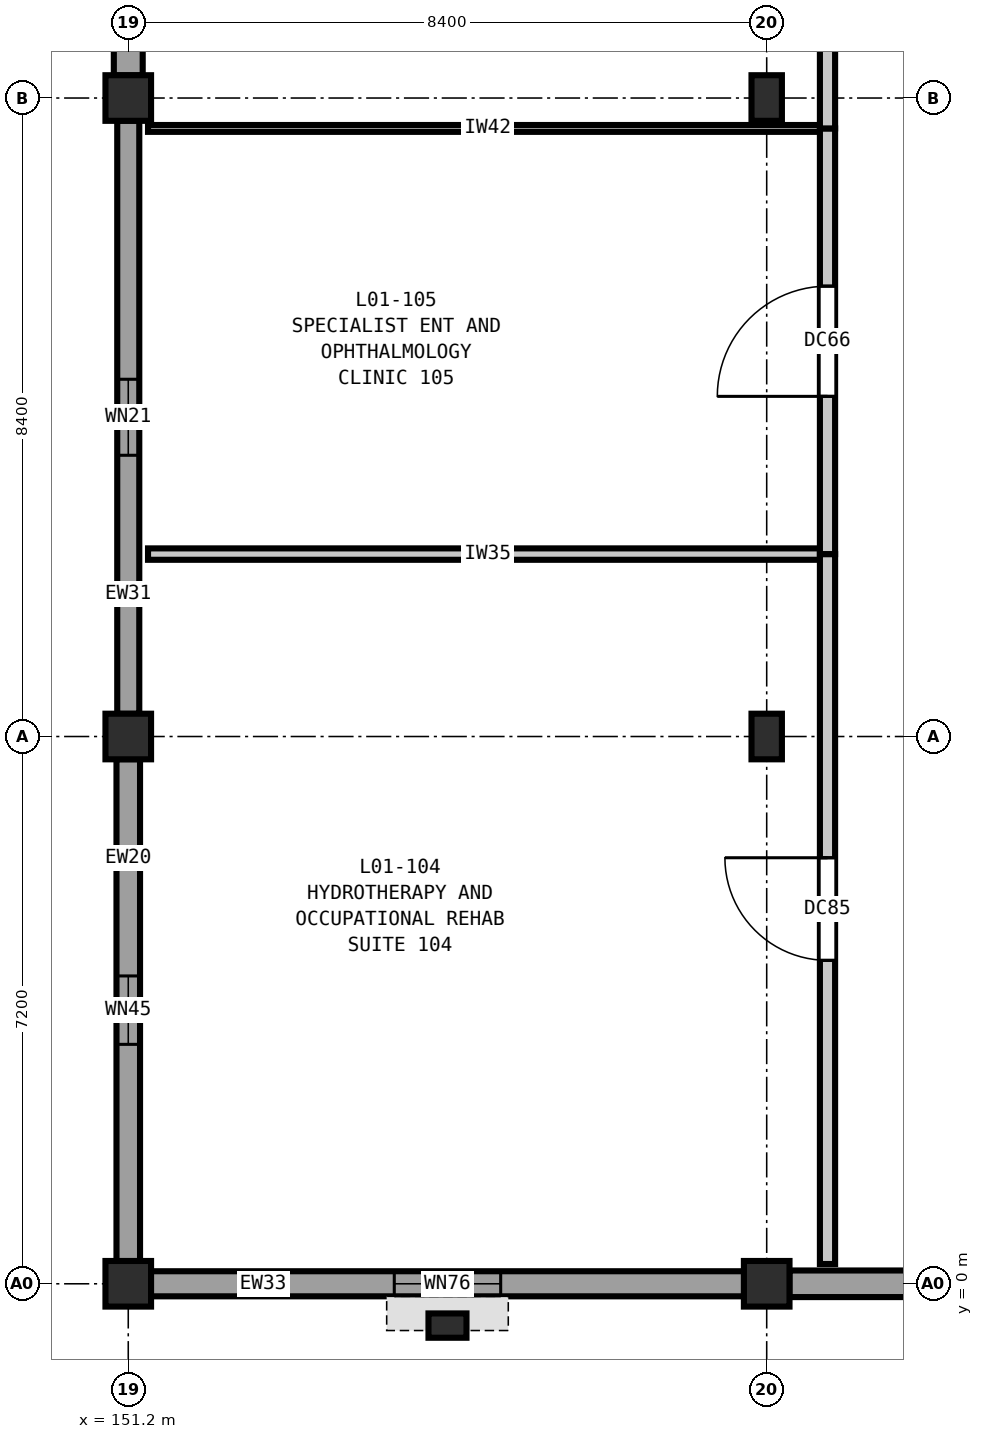
"""IFC4 building model, lengths in metres.
Left out: names, types, materials, properties, quantities, classifications, styles, units other than length and angle.
Written with IfcOpenShell. Run it as: python <this file> out.ifc"""

import sys

from ifc_helpers import new_model, si_unit, direction, frame, frame_2d, origin, origin_2d, place, context, subcontext, project, spatial, rectangle, extrude, element, fill, save


model = new_model("IFC4")
c1 = context("Model", 3, precision=1e-05, world=origin(), true_north=direction((0.0, 1.0)))
c2 = subcontext(c1, "Body", "Model", "MODEL_VIEW")
j1 = project(units=[si_unit("LENGTHUNIT", "METRE"), si_unit("PLANEANGLEUNIT", "RADIAN")], contexts=[c1])
p1 = place(None, origin())
s1 = spatial("IfcSite", under=j1, at=p1, CompositionType="ELEMENT")
p2 = place(p1, origin())
s2 = spatial("IfcBuilding", under=s1, at=p2, CompositionType="ELEMENT")
p3 = place(p2, frame((0.0, 0.0, 5.4)))
s3 = spatial("IfcBuildingStorey", under=s2, at=p3, CompositionType="ELEMENT", Elevation=5.4)
for number, where, z_axis, x_axis in (
    (1, (151.2, 0.0, 0.0), (0.0, 0.0, 1.0), (1.0, 0.0, 0.0)),
    (2, (151.2, 7.2, 0.0), (0.0, 0.0, 1.0), (1.0, 0.0, 0.0)),
    (3, (151.2, 15.6, 0.0), (0.0, 0.0, 1.0), (1.0, 0.0, 0.0)),
    (4, (159.6, 0.0, 0.0), (0.0, 0.0, 1.0), (1.0, 0.0, 0.0)),
):
    element("IfcColumn", number, at=place(p3, frame(where, z_axis=z_axis, x_axis=x_axis)), inside=s3, PredefinedType="COLUMN", context=c2, shape_type="SweptSolid", body=[
        extrude(rectangle(XDim=0.6, YDim=0.6, at=origin_2d()), origin(), (0.0, 0.0, 1.0), 5.4),
    ])
for number, where, z_axis, x_axis in (
    (5, (159.6, 7.2, 0.0), (0.0, 0.0, 1.0), (1.0, 0.0, 0.0)),
    (6, (159.6, 15.6, 0.0), (0.0, 0.0, 1.0), (1.0, 0.0, 0.0)),
):
    element("IfcColumn", number, at=place(p3, frame(where, z_axis=z_axis, x_axis=x_axis)), inside=s3, PredefinedType="COLUMN", context=c2, shape_type="SweptSolid", body=[
        extrude(rectangle(XDim=0.4, YDim=0.6, at=origin_2d()), origin(), (0.0, 0.0, 1.0), 5.4),
    ])
p4 = place(p3, frame((155.4, -0.55, 0.0), z_axis=(0.0, 0.0, 1.0), x_axis=(1.0, 0.0, 0.0)))
e7 = element("IfcColumn", 7, at=p4, inside=s3, PredefinedType="PILASTER", context=c2, shape_type="SweptSolid", body=[
    extrude(rectangle(XDim=0.5, YDim=0.32, at=origin_2d()), origin(), (0.0, 0.0, 1.0), 5.4),
])
p5 = place(p3, frame((167.702, 0.0, 0.0), z_axis=(0.0, 0.0, 1.0), x_axis=(-1.0, 0.0, 0.0)))
e8 = element("IfcWall", 8, at=p5, inside=s3, PredefinedType="SOLIDWALL", context=c2, shape_type="SweptSolid", body=[
    extrude(rectangle(XDim=7.804, YDim=0.35, at=frame_2d((3.902, 0.0))), origin(), (0.0, 0.0, 1.0), 4.68),
])
p6 = place(p5, frame((2.033, 0.0, 0.9)))
e9 = element("IfcOpeningElement", 9, at=p6, cuts=e8, PredefinedType="OPENING", context=c2, shape_type="SweptSolid", body=[
    extrude(rectangle(XDim=1.25, YDim=1.4, at=frame_2d((0.625, 0.7))), frame((0.0, 0.185, 0.0), z_axis=(0.0, -1.0, 0.0), x_axis=(1.0, 0.0, 0.0)), (0.0, 0.0, 1.0), 0.37),
])
p7 = place(p3, frame((159.302, 0.0, 0.0), z_axis=(0.0, 0.0, 1.0), x_axis=(-1.0, 0.0, 0.0)))
e10 = element("IfcWall", 10, at=p7, inside=s3, PredefinedType="SOLIDWALL", context=c2, shape_type="SweptSolid", body=[
    extrude(rectangle(XDim=7.804, YDim=0.33, at=frame_2d((3.902, 0.0))), origin(), (0.0, 0.0, 1.0), 4.68),
])
p8 = place(p7, frame((3.202, 0.0, 0.9)))
e11 = element("IfcOpeningElement", 11, at=p8, cuts=e10, PredefinedType="OPENING", context=c2, shape_type="SweptSolid", body=[
    extrude(rectangle(XDim=1.4, YDim=1.4, at=frame_2d((0.7, 0.7))), frame((0.0, 0.175, 0.0), z_axis=(0.0, -1.0, 0.0), x_axis=(1.0, 0.0, 0.0)), (0.0, 0.0, 1.0), 0.35),
])
p9 = place(p3, frame((151.2, 0.298, 0.0), z_axis=(0.0, 0.0, 1.0), x_axis=(0.0, 1.0, 0.0)))
e12 = element("IfcWall", 12, at=p9, inside=s3, PredefinedType="SOLIDWALL", context=c2, shape_type="SweptSolid", body=[
    extrude(rectangle(XDim=6.604, YDim=0.31, at=frame_2d((3.302, 0.0))), origin(), (0.0, 0.0, 1.0), 4.68),
])
p10 = place(p9, frame((2.852, 0.0, 0.9)))
e13 = element("IfcOpeningElement", 13, at=p10, cuts=e12, PredefinedType="OPENING", context=c2, shape_type="SweptSolid", body=[
    extrude(rectangle(XDim=0.9, YDim=1.55, at=frame_2d((0.45, 0.775))), frame((0.0, 0.165, 0.0), z_axis=(0.0, -1.0, 0.0), x_axis=(1.0, 0.0, 0.0)), (0.0, 0.0, 1.0), 0.33),
])
p11 = place(p3, frame((151.2, 7.498, 0.0), z_axis=(0.0, 0.0, 1.0), x_axis=(0.0, 1.0, 0.0)))
e14 = element("IfcWall", 14, at=p11, inside=s3, PredefinedType="SOLIDWALL", context=c2, shape_type="SweptSolid", body=[
    extrude(rectangle(XDim=7.804, YDim=0.29, at=frame_2d((3.902, 0.0))), origin(), (0.0, 0.0, 1.0), 4.68),
])
p12 = place(p11, frame((3.402, 0.0, 0.9)))
e15 = element("IfcOpeningElement", 15, at=p12, cuts=e14, PredefinedType="OPENING", context=c2, shape_type="SweptSolid", body=[
    extrude(rectangle(XDim=1.0, YDim=1.55, at=frame_2d((0.5, 0.775))), frame((0.0, 0.155, 0.0), z_axis=(0.0, -1.0, 0.0), x_axis=(1.0, 0.0, 0.0)), (0.0, 0.0, 1.0), 0.31),
])
p13 = place(p3, frame((151.2, 15.898, 0.0), z_axis=(0.0, 0.0, 1.0), x_axis=(0.0, 1.0, 0.0)))
e16 = element("IfcWall", 16, at=p13, inside=s3, PredefinedType="SOLIDWALL", context=c2, shape_type="SweptSolid", body=[
    extrude(rectangle(XDim=7.804, YDim=0.38, at=frame_2d((3.902, 0.0))), origin(), (0.0, 0.0, 1.0), 4.68),
])
p14 = place(p13, frame((3.352, 0.0, 0.9)))
e17 = element("IfcOpeningElement", 17, at=p14, cuts=e16, PredefinedType="OPENING", context=c2, shape_type="SweptSolid", body=[
    extrude(rectangle(XDim=1.1, YDim=1.55, at=frame_2d((0.55, 0.775))), frame((0.0, 0.2, 0.0), z_axis=(0.0, -1.0, 0.0), x_axis=(1.0, 0.0, 0.0)), (0.0, 0.0, 1.0), 0.4),
])
p15 = place(p3, frame((151.46, 9.6, 0.0), z_axis=(0.0, 0.0, 1.0), x_axis=(1.0, 0.0, 0.0)))
e18 = element("IfcWall", 18, at=p15, inside=s3, PredefinedType="PARTITIONING", context=c2, shape_type="SweptSolid", body=[
    extrude(rectangle(XDim=8.94, YDim=0.15, at=frame_2d((4.47, 0.0))), origin(), (0.0, 0.0, 1.0), 5.05),
])
p16 = place(p3, frame((151.46, 15.2, 0.0), z_axis=(0.0, 0.0, 1.0), x_axis=(1.0, 0.0, 0.0)))
e19 = element("IfcWall", 19, at=p16, inside=s3, PredefinedType="PARTITIONING", context=c2, shape_type="SweptSolid", body=[
    extrude(rectangle(XDim=8.94, YDim=0.09, at=frame_2d((4.47, 0.0))), origin(), (0.0, 0.0, 1.0), 5.05),
])
p17 = place(p3, frame((160.4, 0.26, 0.0), z_axis=(0.0, 0.0, 1.0), x_axis=(0.0, 1.0, 0.0)))
e20 = element("IfcWall", 20, at=p17, inside=s3, PredefinedType="PARTITIONING", context=c2, shape_type="SweptSolid", body=[
    extrude(rectangle(XDim=9.34, YDim=0.2, at=frame_2d((4.67, 0.0))), origin(), (0.0, 0.0, 1.0), 5.05),
])
p18 = place(p17, frame((3.995, 0.0, 0.0)))
e21 = element("IfcOpeningElement", 21, at=p18, cuts=e20, PredefinedType="OPENING", context=c2, shape_type="SweptSolid", body=[
    extrude(rectangle(XDim=1.35, YDim=2.2, at=frame_2d((0.675, 1.1))), frame((0.0, 0.11, 0.0), z_axis=(0.0, -1.0, 0.0), x_axis=(1.0, 0.0, 0.0)), (0.0, 0.0, 1.0), 0.22),
])
p19 = place(p3, frame((160.4, 9.6, 0.0), z_axis=(0.0, 0.0, 1.0), x_axis=(0.0, 1.0, 0.0)))
e22 = element("IfcWall", 22, at=p19, inside=s3, PredefinedType="PARTITIONING", context=c2, shape_type="SweptSolid", body=[
    extrude(rectangle(XDim=5.6, YDim=0.2, at=frame_2d((2.8, 0.0))), origin(), (0.0, 0.0, 1.0), 5.05),
])
p20 = place(p19, frame((2.075, 0.0, 0.0)))
e23 = element("IfcOpeningElement", 23, at=p20, cuts=e22, PredefinedType="OPENING", context=c2, shape_type="SweptSolid", body=[
    extrude(rectangle(XDim=1.45, YDim=2.25, at=frame_2d((0.725, 1.125))), frame((0.0, 0.11, 0.0), z_axis=(0.0, -1.0, 0.0), x_axis=(1.0, 0.0, 0.0)), (0.0, 0.0, 1.0), 0.22),
])
p21 = place(p3, frame((160.4, 15.2, 0.0), z_axis=(0.0, 0.0, 1.0), x_axis=(0.0, 1.0, 0.0)))
e24 = element("IfcWall", 24, at=p21, inside=s3, PredefinedType="PARTITIONING", context=c2, shape_type="SweptSolid", body=[
    extrude(rectangle(XDim=9.6, YDim=0.2, at=frame_2d((4.8, 0.0))), origin(), (0.0, 0.0, 1.0), 5.05),
])
p22 = place(p21, frame((4.025, 0.0, 0.0)))
e25 = element("IfcOpeningElement", 25, at=p22, cuts=e24, PredefinedType="OPENING", context=c2, shape_type="SweptSolid", body=[
    extrude(rectangle(XDim=1.55, YDim=2.25, at=frame_2d((0.775, 1.125))), frame((0.0, 0.11, 0.0), z_axis=(0.0, -1.0, 0.0), x_axis=(1.0, 0.0, 0.0)), (0.0, 0.0, 1.0), 0.22),
])
p23 = place(p8, origin())
e26 = element("IfcWindow", 26, at=p23, inside=s3, PartitioningType="SINGLE_PANEL", PredefinedType="WINDOW", context=c2, shape_type="SweptSolid", body=[
    extrude(rectangle(XDim=1.4, YDim=1.4, at=frame_2d((0.7, 0.7))), frame((0.0, 0.03, 0.0), z_axis=(0.0, -1.0, 0.0), x_axis=(1.0, 0.0, 0.0)), (0.0, 0.0, 1.0), 0.06),
])
fill(e11, e26)
p24 = place(p10, origin())
e27 = element("IfcWindow", 27, at=p24, inside=s3, PartitioningType="SINGLE_PANEL", PredefinedType="WINDOW", context=c2, shape_type="SweptSolid", body=[
    extrude(rectangle(XDim=0.9, YDim=1.55, at=frame_2d((0.45, 0.775))), frame((0.0, 0.03, 0.0), z_axis=(0.0, -1.0, 0.0), x_axis=(1.0, 0.0, 0.0)), (0.0, 0.0, 1.0), 0.06),
])
fill(e13, e27)
p25 = place(p12, origin())
e28 = element("IfcWindow", 28, at=p25, inside=s3, PartitioningType="SINGLE_PANEL", PredefinedType="WINDOW", context=c2, shape_type="SweptSolid", body=[
    extrude(rectangle(XDim=1.0, YDim=1.55, at=frame_2d((0.5, 0.775))), frame((0.0, 0.03, 0.0), z_axis=(0.0, -1.0, 0.0), x_axis=(1.0, 0.0, 0.0)), (0.0, 0.0, 1.0), 0.06),
])
fill(e15, e28)
p26 = place(p18, origin())
e29 = element("IfcDoor", 29, at=p26, inside=s3, OperationType="SINGLE_SWING_RIGHT", PredefinedType="DOOR", context=c2, shape_type="SweptSolid", body=[
    extrude(rectangle(XDim=1.35, YDim=2.2, at=frame_2d((0.675, 1.1))), frame((0.0, 0.025, 0.0), z_axis=(0.0, -1.0, 0.0), x_axis=(1.0, 0.0, 0.0)), (0.0, 0.0, 1.0), 0.05),
])
fill(e21, e29)
p27 = place(p20, origin())
e30 = element("IfcDoor", 30, at=p27, inside=s3, OperationType="SINGLE_SWING_LEFT", PredefinedType="DOOR", context=c2, shape_type="SweptSolid", body=[
    extrude(rectangle(XDim=1.45, YDim=2.25, at=frame_2d((0.725, 1.125))), frame((0.0, 0.025, 0.0), z_axis=(0.0, -1.0, 0.0), x_axis=(1.0, 0.0, 0.0)), (0.0, 0.0, 1.0), 0.05),
])
fill(e23, e30)
save(model, sys.argv[1])
